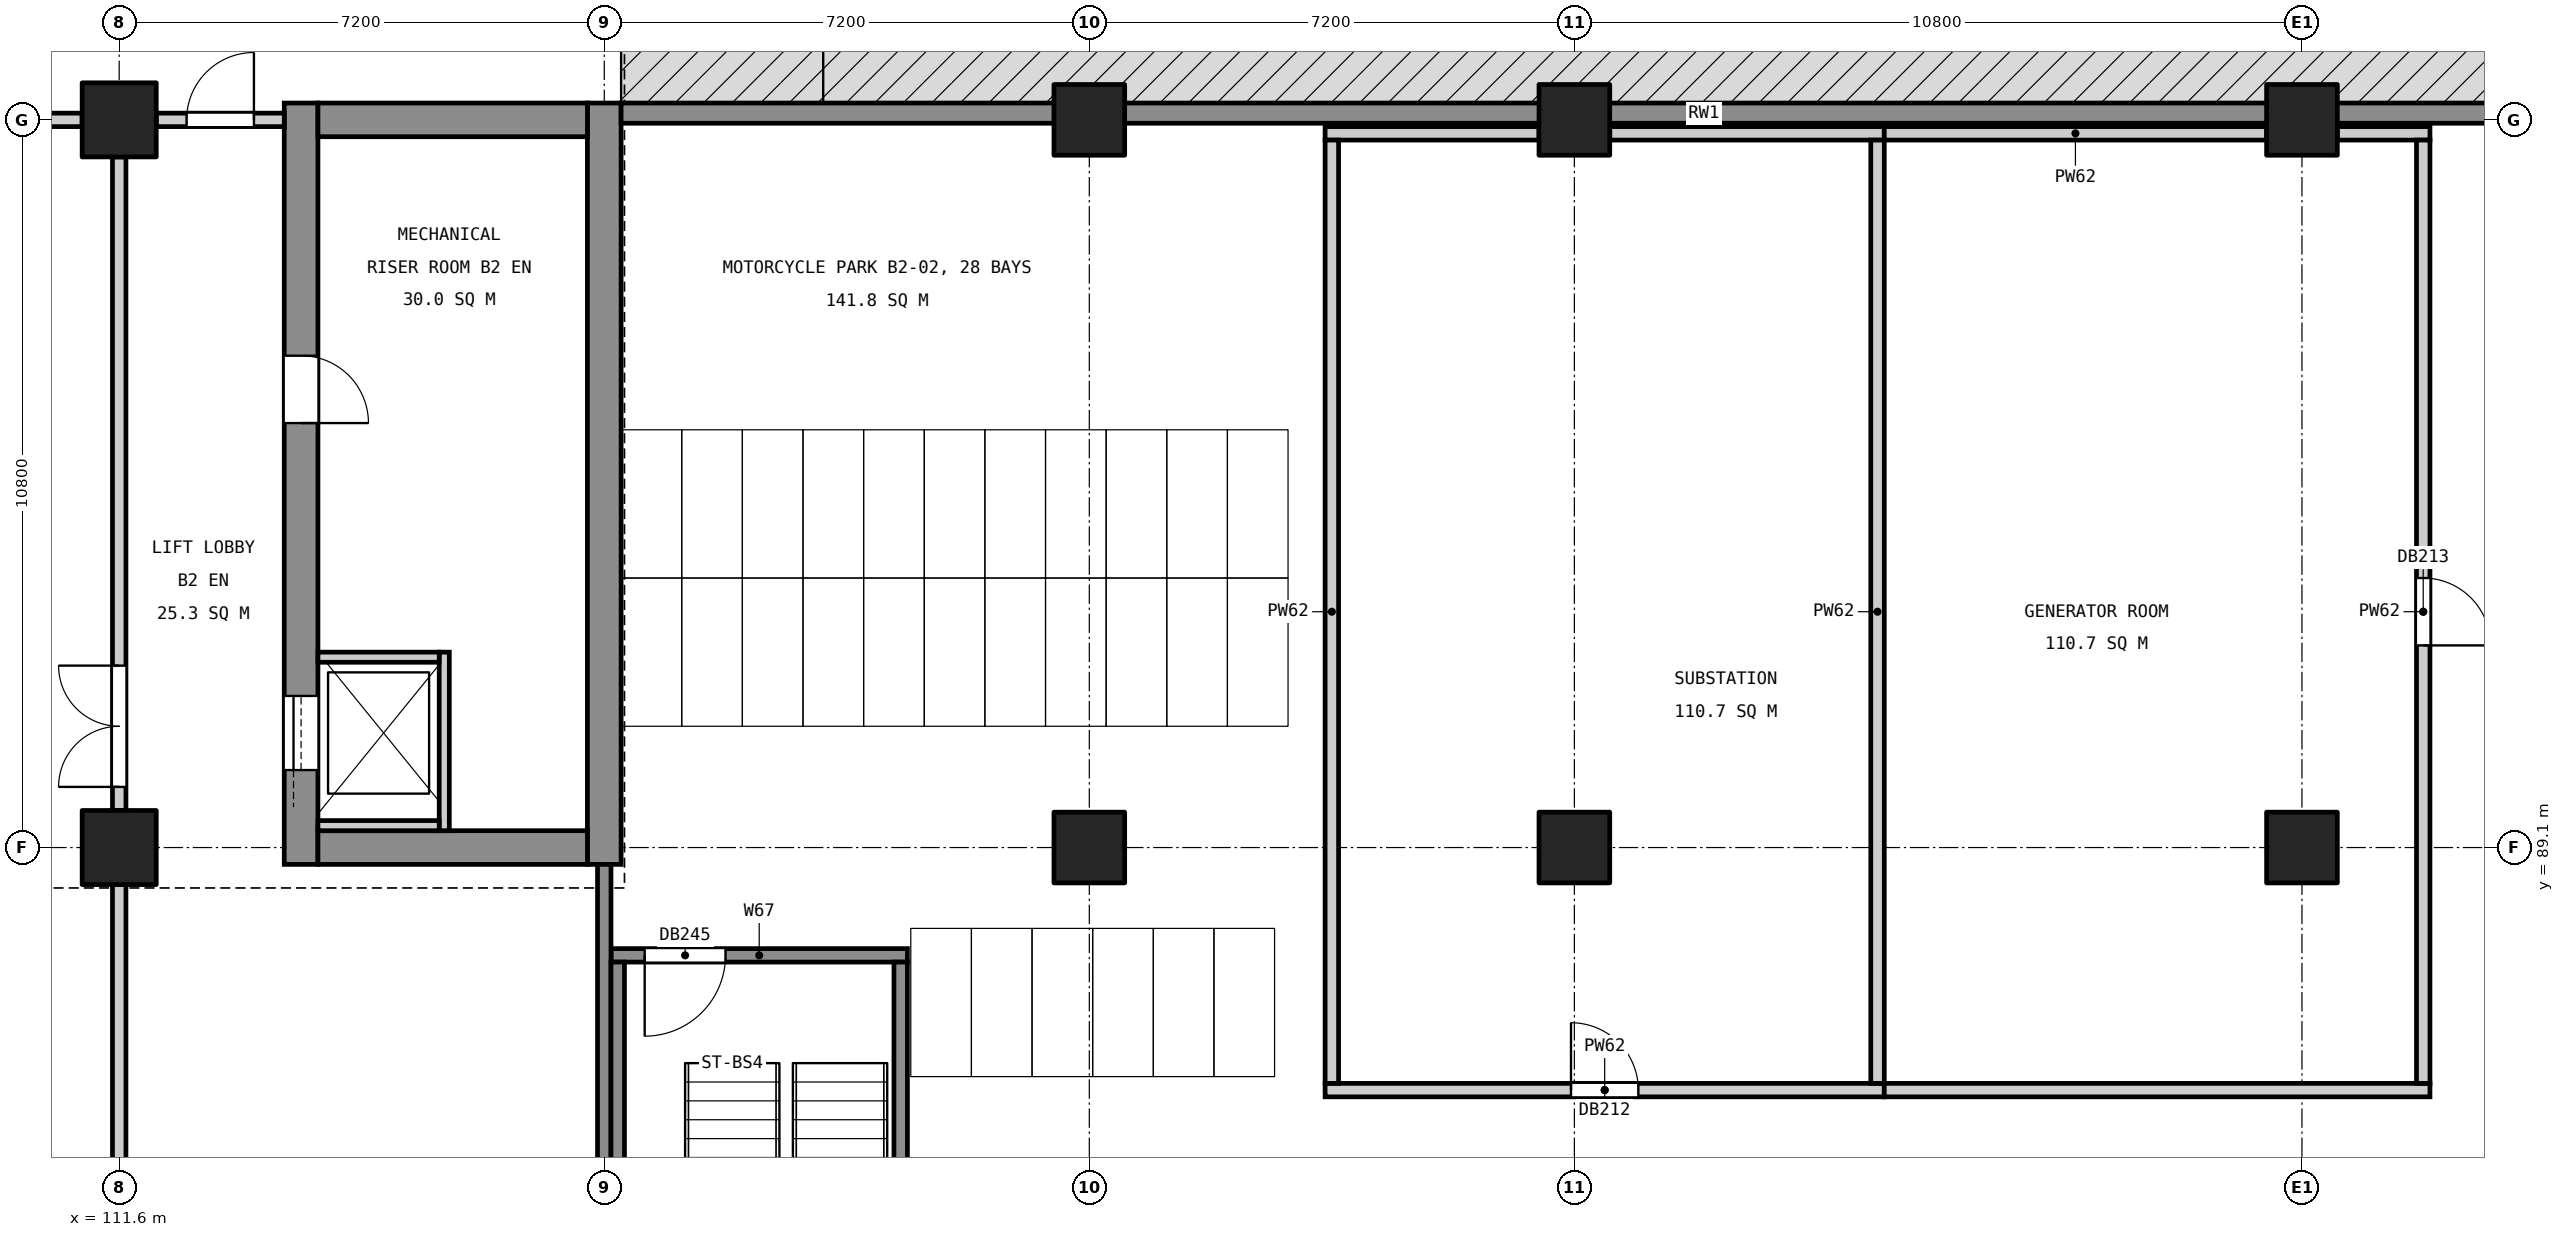
"""IFC4 building model, lengths in metres.
Left out: names, types, materials, properties, quantities, classifications, styles, units other than length and angle.
Written with IfcOpenShell. Run it as: python <this file> out.ifc"""

import sys

from ifc_helpers import new_model, si_unit, direction, frame, frame_2d, origin, origin_2d, place, context, subcontext, project, spatial, polyline, rectangle, outline, extrude, element, fill, save


model = new_model("IFC4")
c1 = context("Model", 3, precision=1e-05, world=origin(), true_north=direction((0.0, 1.0)))
c2 = subcontext(c1, "Body", "Model", "MODEL_VIEW")
j1 = project(units=[si_unit("LENGTHUNIT", "METRE"), si_unit("PLANEANGLEUNIT", "RADIAN")], contexts=[c1])
p1 = place(None, origin())
s1 = spatial("IfcSite", under=j1, at=p1, CompositionType="ELEMENT")
p2 = place(p1, origin())
s2 = spatial("IfcBuilding", under=s1, at=p2, CompositionType="ELEMENT")
p3 = place(p2, frame((0.0, 0.0, -9.6)))
s3 = spatial("IfcBuildingStorey", under=s2, at=p3, CompositionType="ELEMENT", Elevation=-9.6)
for number, where, z_axis, x_axis in (
    (1, (111.6, 89.1, 0.0), (0.0, 0.0, 1.0), (1.0, 0.0, 0.0)),
    (2, (111.6, 99.9, 0.0), (0.0, 0.0, 1.0), (1.0, 0.0, 0.0)),
):
    element("IfcColumn", number, at=place(p3, frame(where, z_axis=z_axis, x_axis=x_axis)), inside=s3, PredefinedType="COLUMN", context=c2, shape_type="SweptSolid", body=[
        extrude(rectangle(XDim=1.1, YDim=1.1, at=origin_2d()), origin(), (0.0, 0.0, 1.0), 4.35),
    ])
p4 = place(p3, frame((126.0, 89.1, 0.0), z_axis=(0.0, 0.0, 1.0), x_axis=(1.0, 0.0, 0.0)))
e3 = element("IfcColumn", 3, at=p4, inside=s3, PredefinedType="COLUMN", context=c2, shape_type="SweptSolid", body=[
    extrude(rectangle(XDim=1.05, YDim=1.05, at=origin_2d()), origin(), (0.0, 0.0, 1.0), 4.35),
])
p5 = place(p3, frame((126.0, 99.9, 0.0), z_axis=(0.0, 0.0, 1.0), x_axis=(1.0, 0.0, 0.0)))
e4 = element("IfcColumn", 4, at=p5, inside=s3, PredefinedType="COLUMN", context=c2, shape_type="SweptSolid", body=[
    extrude(rectangle(XDim=1.05, YDim=1.05, at=origin_2d()), origin(), (0.0, 0.0, 1.0), 4.8),
])
p6 = place(p3, frame((133.2, 89.1, 0.0), z_axis=(0.0, 0.0, 1.0), x_axis=(1.0, 0.0, 0.0)))
e5 = element("IfcColumn", 5, at=p6, inside=s3, PredefinedType="COLUMN", context=c2, shape_type="SweptSolid", body=[
    extrude(rectangle(XDim=1.05, YDim=1.05, at=origin_2d()), origin(), (0.0, 0.0, 1.0), 4.35),
])
p7 = place(p3, frame((133.2, 99.9, 0.0), z_axis=(0.0, 0.0, 1.0), x_axis=(1.0, 0.0, 0.0)))
e6 = element("IfcColumn", 6, at=p7, inside=s3, PredefinedType="COLUMN", context=c2, shape_type="SweptSolid", body=[
    extrude(rectangle(XDim=1.05, YDim=1.05, at=origin_2d()), origin(), (0.0, 0.0, 1.0), 4.8),
])
for number, where, z_axis, x_axis in (
    (7, (144.0, 89.1, 0.0), (0.0, 0.0, 1.0), (1.0, 0.0, 0.0)),
    (8, (144.0, 99.9, 0.0), (0.0, 0.0, 1.0), (1.0, 0.0, 0.0)),
):
    element("IfcColumn", number, at=place(p3, frame(where, z_axis=z_axis, x_axis=x_axis)), inside=s3, PredefinedType="COLUMN", context=c2, shape_type="SweptSolid", body=[
        extrude(rectangle(XDim=1.05, YDim=1.05, at=origin_2d()), origin(), (0.0, 0.0, 1.0), 4.35),
    ])
p8 = place(p3, frame((118.8, 88.85, 0.0), z_axis=(0.0, 0.0, 1.0), x_axis=(0.0, 1.0, 0.0)))
e9 = element("IfcWall", 9, at=p8, inside=s3, PredefinedType="SHEAR", context=c2, shape_type="SweptSolid", body=[
    extrude(rectangle(XDim=11.3, YDim=0.5, at=frame_2d((5.65, 0.0))), origin(), (0.0, 0.0, 1.0), 4.35),
])
p9 = place(p3, frame((114.3, 88.85, 0.0), z_axis=(0.0, 0.0, 1.0), x_axis=(0.0, 1.0, 0.0)))
e10 = element("IfcWall", 10, at=p9, inside=s3, PredefinedType="SHEAR", context=c2, shape_type="SweptSolid", body=[
    extrude(rectangle(XDim=11.3, YDim=0.5, at=frame_2d((5.65, 0.0))), origin(), (0.0, 0.0, 1.0), 4.35),
])
p10 = place(p9, frame((1.4, 0.0, 0.0)))
e11 = element("IfcOpeningElement", 11, at=p10, cuts=e10, PredefinedType="OPENING", context=c2, shape_type="SweptSolid", body=[
    extrude(rectangle(XDim=1.1, YDim=2.1, at=frame_2d((0.55, 1.05))), frame((0.0, 0.26, 0.0), z_axis=(0.0, -1.0, 0.0), x_axis=(1.0, 0.0, 0.0)), (0.0, 0.0, 1.0), 0.52),
])
p11 = place(p9, frame((6.55, 0.0, 0.0)))
e12 = element("IfcOpeningElement", 12, at=p11, cuts=e10, PredefinedType="OPENING", context=c2, shape_type="SweptSolid", body=[
    extrude(rectangle(XDim=1.0, YDim=2.1, at=frame_2d((0.5, 1.05))), frame((0.0, 0.26, 0.0), z_axis=(0.0, -1.0, 0.0), x_axis=(1.0, 0.0, 0.0)), (0.0, 0.0, 1.0), 0.52),
])
for number, where, z_axis, x_axis in (
    (13, (118.55, 89.1, 0.0), (0.0, 0.0, 1.0), (-1.0, 0.0, 0.0)),
    (14, (118.55, 99.9, 0.0), (0.0, 0.0, 1.0), (-1.0, 0.0, 0.0)),
):
    element("IfcWall", number, at=place(p3, frame(where, z_axis=z_axis, x_axis=x_axis)), inside=s3, PredefinedType="SHEAR", context=c2, shape_type="SweptSolid", body=[
        extrude(rectangle(XDim=4.0, YDim=0.5, at=frame_2d((2.0, 0.0))), origin(), (0.0, 0.0, 1.0), 4.35),
    ])
p12 = place(p3, frame((116.425, 92.0, 0.0), z_axis=(0.0, 0.0, 1.0), x_axis=(0.0, -1.0, 0.0)))
e15 = element("IfcWall", 15, at=p12, inside=s3, PredefinedType="SOLIDWALL", context=c2, shape_type="SweptSolid", body=[
    extrude(rectangle(XDim=2.65, YDim=0.15, at=frame_2d((1.325, 0.0))), origin(), (0.0, 0.0, 1.0), 4.8),
])
for number, where, z_axis, x_axis in (
    (16, (116.35, 91.925, 0.0), (0.0, 0.0, 1.0), (-1.0, 0.0, 0.0)),
    (17, (116.35, 89.425, 0.0), (0.0, 0.0, 1.0), (-1.0, 0.0, 0.0)),
):
    element("IfcWall", number, at=place(p3, frame(where, z_axis=z_axis, x_axis=x_axis)), inside=s3, PredefinedType="SOLIDWALL", context=c2, shape_type="SweptSolid", body=[
        extrude(rectangle(XDim=1.8, YDim=0.15, at=frame_2d((0.9, 0.0))), origin(), (0.0, 0.0, 1.0), 4.8),
    ])
p13 = place(p3, frame((119.05, 100.0, 0.0), z_axis=(0.0, 0.0, 1.0), x_axis=(1.0, 0.0, 0.0)))
e18 = element("IfcWall", 18, at=p13, inside=s3, PredefinedType="SOLIDWALL", context=c2, shape_type="SweptSolid", body=[
    extrude(outline(polyline([(0.0, 0.0), (32.15, 0.0), (32.15, 1.1), (32.0, 1.113), (31.0, 1.196), (30.0, 1.279), (29.15, 1.35), (29.0, 1.375), (28.0, 1.539), (27.0, 1.704), (26.0, 1.868), (25.0, 2.032), (24.0, 2.197), (23.0, 2.361), (22.0, 2.526), (21.0, 2.69), (20.0, 2.855), (19.0, 3.019), (18.0, 3.184), (17.0, 3.348), (16.0, 3.512), (15.0, 3.677), (14.0, 3.841), (13.0, 4.006), (12.0, 4.17), (11.0, 4.335), (10.0, 4.499), (9.0, 4.664), (8.0, 4.828), (7.0, 4.992), (6.0, 5.157), (5.0, 5.321), (4.0, 5.486), (3.0, 5.65), (2.0, 5.733), (1.0, 5.817), (0.0, 5.9), (0.0, 0.0)])), frame((0.0, 0.15, 0.0), z_axis=(0.0, -1.0, 0.0), x_axis=(1.0, 0.0, 0.0)), (0.0, 0.0, 1.0), 0.3),
])
p14 = place(p3, frame((129.5, 85.5, 0.0), z_axis=(0.0, 0.0, 1.0), x_axis=(1.0, 0.0, 0.0)))
e19 = element("IfcWall", 19, at=p14, inside=s3, PredefinedType="PARTITIONING", context=c2, shape_type="SweptSolid", body=[
    extrude(rectangle(XDim=8.3, YDim=0.2, at=frame_2d((4.15, 0.0))), origin(), (0.0, 0.0, 1.0), 4.35),
])
p15 = place(p14, frame((3.65, 0.0, 0.0)))
e20 = element("IfcOpeningElement", 20, at=p15, cuts=e19, PredefinedType="OPENING", context=c2, shape_type="SweptSolid", body=[
    extrude(rectangle(XDim=1.0, YDim=2.1, at=frame_2d((0.5, 1.05))), frame((0.0, 0.11, 0.0), z_axis=(0.0, -1.0, 0.0), x_axis=(1.0, 0.0, 0.0)), (0.0, 0.0, 1.0), 0.22),
])
p16 = place(p3, frame((137.8, 85.5, 0.0), z_axis=(0.0, 0.0, 1.0), x_axis=(1.0, 0.0, 0.0)))
e21 = element("IfcWall", 21, at=p16, inside=s3, PredefinedType="PARTITIONING", context=c2, shape_type="SweptSolid", body=[
    extrude(rectangle(XDim=8.1, YDim=0.2, at=frame_2d((4.05, 0.0))), origin(), (0.0, 0.0, 1.0), 4.35),
])
p17 = place(p3, frame((118.9, 87.5, 0.0), z_axis=(0.0, 0.0, 1.0), x_axis=(1.0, 0.0, 0.0)))
e22 = element("IfcWall", 22, at=p17, inside=s3, PredefinedType="SOLIDWALL", context=c2, shape_type="SweptSolid", body=[
    extrude(rectangle(XDim=4.4, YDim=0.2, at=frame_2d((2.2, 0.0))), origin(), (0.0, 0.0, 1.0), 4.35),
])
p18 = place(p17, frame((0.5, 0.0, 0.0)))
e23 = element("IfcOpeningElement", 23, at=p18, cuts=e22, PredefinedType="OPENING", context=c2, shape_type="SweptSolid", body=[
    extrude(rectangle(XDim=1.2, YDim=2.1, at=frame_2d((0.6, 1.05))), frame((0.0, 0.11, 0.0), z_axis=(0.0, -1.0, 0.0), x_axis=(1.0, 0.0, 0.0)), (0.0, 0.0, 1.0), 0.22),
])
p19 = place(p3, frame((129.5, 99.7, 0.0), z_axis=(0.0, 0.0, 1.0), x_axis=(1.0, 0.0, 0.0)))
e24 = element("IfcWall", 24, at=p19, inside=s3, PredefinedType="PARTITIONING", context=c2, shape_type="SweptSolid", body=[
    extrude(rectangle(XDim=3.175, YDim=0.2, at=frame_2d((1.587, 0.0))), origin(), (0.0, 0.0, 1.0), 4.35),
])
p20 = place(p3, frame((133.725, 99.7, 0.0), z_axis=(0.0, 0.0, 1.0), x_axis=(1.0, 0.0, 0.0)))
e25 = element("IfcWall", 25, at=p20, inside=s3, PredefinedType="PARTITIONING", context=c2, shape_type="SweptSolid", body=[
    extrude(rectangle(XDim=4.075, YDim=0.2, at=frame_2d((2.038, 0.0))), origin(), (0.0, 0.0, 1.0), 4.35),
])
p21 = place(p3, frame((137.8, 99.7, 0.0), z_axis=(0.0, 0.0, 1.0), x_axis=(1.0, 0.0, 0.0)))
e26 = element("IfcWall", 26, at=p21, inside=s3, PredefinedType="PARTITIONING", context=c2, shape_type="SweptSolid", body=[
    extrude(rectangle(XDim=5.675, YDim=0.2, at=frame_2d((2.837, 0.0))), origin(), (0.0, 0.0, 1.0), 4.35),
])
p22 = place(p3, frame((144.525, 99.7, 0.0), z_axis=(0.0, 0.0, 1.0), x_axis=(1.0, 0.0, 0.0)))
e27 = element("IfcWall", 27, at=p22, inside=s3, PredefinedType="PARTITIONING", context=c2, shape_type="SweptSolid", body=[
    extrude(rectangle(XDim=1.375, YDim=0.2, at=frame_2d((0.688, 0.0))), origin(), (0.0, 0.0, 1.0), 4.35),
])
p23 = place(p3, frame((101.35, 99.9, 0.0), z_axis=(0.0, 0.0, 1.0), x_axis=(1.0, 0.0, 0.0)))
e28 = element("IfcWall", 28, at=p23, inside=s3, PredefinedType="PARTITIONING", context=c2, shape_type="SweptSolid", body=[
    extrude(rectangle(XDim=9.7, YDim=0.2, at=frame_2d((4.85, 0.0))), origin(), (0.0, 0.0, 1.0), 4.35),
])
p24 = place(p3, frame((112.15, 99.9, 0.0), z_axis=(0.0, 0.0, 1.0), x_axis=(1.0, 0.0, 0.0)))
e29 = element("IfcWall", 29, at=p24, inside=s3, PredefinedType="PARTITIONING", context=c2, shape_type="SweptSolid", body=[
    extrude(rectangle(XDim=1.9, YDim=0.2, at=frame_2d((0.95, 0.0))), origin(), (0.0, 0.0, 1.0), 4.35),
])
p25 = place(p24, frame((0.45, 0.0, 0.0)))
e30 = element("IfcOpeningElement", 30, at=p25, cuts=e29, PredefinedType="OPENING", context=c2, shape_type="SweptSolid", body=[
    extrude(rectangle(XDim=1.0, YDim=2.1, at=frame_2d((0.5, 1.05))), frame((0.0, 0.11, 0.0), z_axis=(0.0, -1.0, 0.0), x_axis=(1.0, 0.0, 0.0)), (0.0, 0.0, 1.0), 0.22),
])
p26 = place(p3, frame((111.6, 82.0, 0.0), z_axis=(0.0, 0.0, 1.0), x_axis=(0.0, 1.0, 0.0)))
e31 = element("IfcWall", 31, at=p26, inside=s3, PredefinedType="PARTITIONING", context=c2, shape_type="SweptSolid", body=[
    extrude(rectangle(XDim=6.55, YDim=0.2, at=frame_2d((3.275, 0.0))), origin(), (0.0, 0.0, 1.0), 4.35),
])
p27 = place(p3, frame((111.6, 89.65, 0.0), z_axis=(0.0, 0.0, 1.0), x_axis=(0.0, 1.0, 0.0)))
e32 = element("IfcWall", 32, at=p27, inside=s3, PredefinedType="PARTITIONING", context=c2, shape_type="SweptSolid", body=[
    extrude(rectangle(XDim=9.7, YDim=0.2, at=frame_2d((4.85, 0.0))), origin(), (0.0, 0.0, 1.0), 4.35),
])
p28 = place(p27, frame((0.35, 0.0, 0.0)))
e33 = element("IfcOpeningElement", 33, at=p28, cuts=e32, PredefinedType="OPENING", context=c2, shape_type="SweptSolid", body=[
    extrude(rectangle(XDim=1.8, YDim=2.1, at=frame_2d((0.9, 1.05))), frame((0.0, 0.11, 0.0), z_axis=(0.0, -1.0, 0.0), x_axis=(1.0, 0.0, 0.0)), (0.0, 0.0, 1.0), 0.22),
])
p29 = place(p3, frame((118.8, 78.85, 0.0), z_axis=(0.0, 0.0, 1.0), x_axis=(0.0, 1.0, 0.0)))
e34 = element("IfcWall", 34, at=p29, inside=s3, PredefinedType="SOLIDWALL", context=c2, shape_type="SweptSolid", body=[
    extrude(rectangle(XDim=10.0, YDim=0.2, at=frame_2d((5.0, 0.0))), origin(), (0.0, 0.0, 1.0), 4.35),
])
for number, where, z_axis, x_axis in (
    (35, (119.0, 80.6, 0.0), (0.0, 0.0, 1.0), (0.0, 1.0, 0.0)),
    (36, (123.2, 80.6, 0.0), (0.0, 0.0, 1.0), (0.0, 1.0, 0.0)),
):
    element("IfcWall", number, at=place(p3, frame(where, z_axis=z_axis, x_axis=x_axis)), inside=s3, PredefinedType="SOLIDWALL", context=c2, shape_type="SweptSolid", body=[
        extrude(rectangle(XDim=6.8, YDim=0.2, at=frame_2d((3.4, 0.0))), origin(), (0.0, 0.0, 1.0), 4.35),
    ])
for number, where, z_axis, x_axis in (
    (37, (129.6, 85.6, 0.0), (0.0, 0.0, 1.0), (0.0, 1.0, 0.0)),
    (38, (137.7, 85.6, 0.0), (0.0, 0.0, 1.0), (0.0, 1.0, 0.0)),
):
    element("IfcWall", number, at=place(p3, frame(where, z_axis=z_axis, x_axis=x_axis)), inside=s3, PredefinedType="PARTITIONING", context=c2, shape_type="SweptSolid", body=[
        extrude(rectangle(XDim=14.0, YDim=0.2, at=frame_2d((7.0, 0.0))), origin(), (0.0, 0.0, 1.0), 4.35),
    ])
p30 = place(p3, frame((145.8, 85.6, 0.0), z_axis=(0.0, 0.0, 1.0), x_axis=(0.0, 1.0, 0.0)))
e39 = element("IfcWall", 39, at=p30, inside=s3, PredefinedType="PARTITIONING", context=c2, shape_type="SweptSolid", body=[
    extrude(rectangle(XDim=14.0, YDim=0.2, at=frame_2d((7.0, 0.0))), origin(), (0.0, 0.0, 1.0), 4.35),
])
p31 = place(p30, frame((6.5, 0.0, 0.0)))
e40 = element("IfcOpeningElement", 40, at=p31, cuts=e39, PredefinedType="OPENING", context=c2, shape_type="SweptSolid", body=[
    extrude(rectangle(XDim=1.0, YDim=2.1, at=frame_2d((0.5, 1.05))), frame((0.0, 0.11, 0.0), z_axis=(0.0, -1.0, 0.0), x_axis=(1.0, 0.0, 0.0)), (0.0, 0.0, 1.0), 0.22),
])
p32 = place(p10, origin())
e41 = element("IfcDoor", 41, at=p32, inside=s3, OperationType="SLIDING_TO_LEFT", PredefinedType="DOOR", context=c2, shape_type="SweptSolid", body=[
    extrude(rectangle(XDim=1.1, YDim=2.1, at=frame_2d((0.55, 1.05))), frame((0.0, 0.025, 0.0), z_axis=(0.0, -1.0, 0.0), x_axis=(1.0, 0.0, 0.0)), (0.0, 0.0, 1.0), 0.05),
])
fill(e11, e41)
p33 = place(p15, origin())
e42 = element("IfcDoor", 42, at=p33, inside=s3, OperationType="SINGLE_SWING_LEFT", PredefinedType="DOOR", context=c2, shape_type="SweptSolid", body=[
    extrude(rectangle(XDim=1.0, YDim=2.1, at=frame_2d((0.5, 1.05))), frame((0.0, 0.025, 0.0), z_axis=(0.0, -1.0, 0.0), x_axis=(1.0, 0.0, 0.0)), (0.0, 0.0, 1.0), 0.05),
])
fill(e20, e42)
p34 = place(p31, frame((1.0, 0.0, 0.0), z_axis=(0.0, 0.0, 1.0), x_axis=(-1.0, 0.0, 0.0)))
e43 = element("IfcDoor", 43, at=p34, inside=s3, OperationType="SINGLE_SWING_RIGHT", PredefinedType="DOOR", context=c2, shape_type="SweptSolid", body=[
    extrude(rectangle(XDim=1.0, YDim=2.1, at=frame_2d((0.5, 1.05))), frame((0.0, 0.025, 0.0), z_axis=(0.0, -1.0, 0.0), x_axis=(1.0, 0.0, 0.0)), (0.0, 0.0, 1.0), 0.05),
])
fill(e40, e43)
p35 = place(p28, origin())
e44 = element("IfcDoor", 44, at=p35, inside=s3, OperationType="DOUBLE_DOOR_SINGLE_SWING", PredefinedType="DOOR", context=c2, shape_type="SweptSolid", body=[
    extrude(rectangle(XDim=1.8, YDim=2.1, at=frame_2d((0.9, 1.05))), frame((0.0, 0.025, 0.0), z_axis=(0.0, -1.0, 0.0), x_axis=(1.0, 0.0, 0.0)), (0.0, 0.0, 1.0), 0.05),
])
fill(e33, e44)
p36 = place(p25, origin())
e45 = element("IfcDoor", 45, at=p36, inside=s3, OperationType="SINGLE_SWING_RIGHT", PredefinedType="DOOR", context=c2, shape_type="SweptSolid", body=[
    extrude(rectangle(XDim=1.0, YDim=2.1, at=frame_2d((0.5, 1.05))), frame((0.0, 0.025, 0.0), z_axis=(0.0, -1.0, 0.0), x_axis=(1.0, 0.0, 0.0)), (0.0, 0.0, 1.0), 0.05),
])
fill(e30, e45)
p37 = place(p11, frame((1.0, 0.0, 0.0), z_axis=(0.0, 0.0, 1.0), x_axis=(-1.0, 0.0, 0.0)))
e46 = element("IfcDoor", 46, at=p37, inside=s3, OperationType="SINGLE_SWING_RIGHT", PredefinedType="DOOR", context=c2, shape_type="SweptSolid", body=[
    extrude(rectangle(XDim=1.0, YDim=2.1, at=frame_2d((0.5, 1.05))), frame((0.0, 0.025, 0.0), z_axis=(0.0, -1.0, 0.0), x_axis=(1.0, 0.0, 0.0)), (0.0, 0.0, 1.0), 0.05),
])
fill(e12, e46)
p38 = place(p18, frame((1.2, 0.0, 0.0), z_axis=(0.0, 0.0, 1.0), x_axis=(-1.0, 0.0, 0.0)))
e47 = element("IfcDoor", 47, at=p38, inside=s3, OperationType="SINGLE_SWING_RIGHT", PredefinedType="DOOR", context=c2, shape_type="SweptSolid", body=[
    extrude(rectangle(XDim=1.2, YDim=2.1, at=frame_2d((0.6, 1.05))), frame((0.0, 0.025, 0.0), z_axis=(0.0, -1.0, 0.0), x_axis=(1.0, 0.0, 0.0)), (0.0, 0.0, 1.0), 0.05),
])
fill(e23, e47)
save(model, sys.argv[1])
